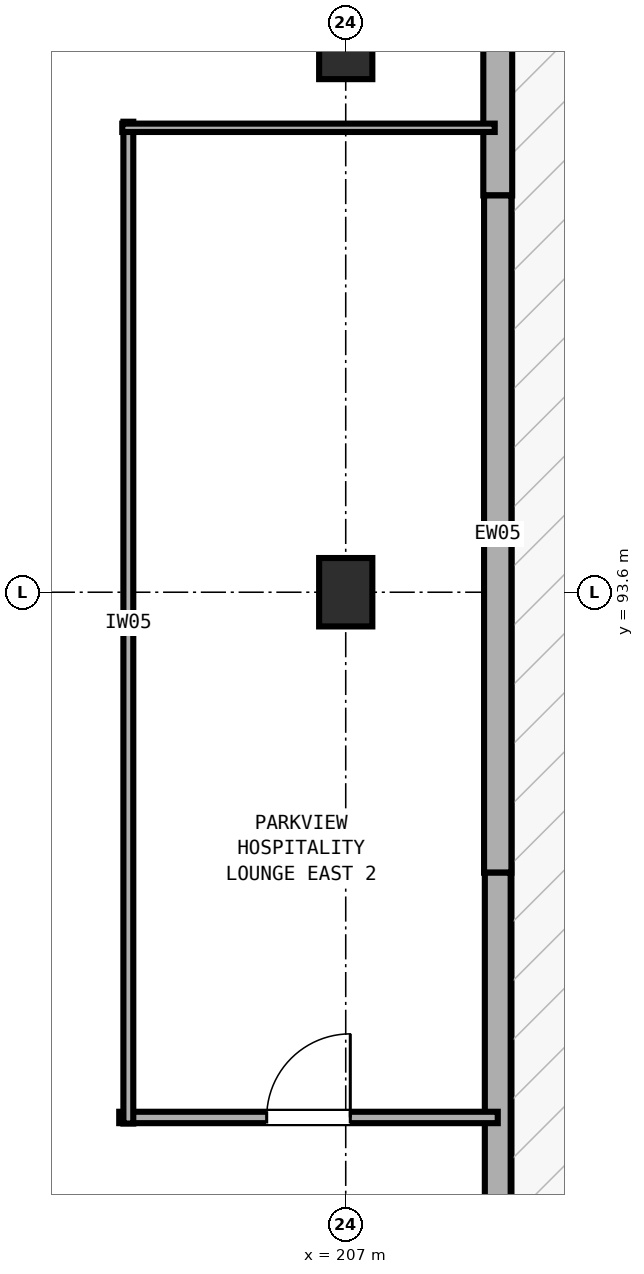
"""IFC4 building model, lengths in metres.
Left out: names, types, materials, properties, quantities, classifications, styles, units other than length and angle.
Written with IfcOpenShell. Run it as: python <this file> out.ifc"""

import sys

from ifc_helpers import new_model, si_unit, direction, frame, frame_2d, origin, origin_2d, place, context, subcontext, project, spatial, rectangle, extrude, element, fill, save


model = new_model("IFC4")
c1 = context("Model", 3, precision=1e-05, world=origin(), true_north=direction((0.0, 1.0)))
c2 = subcontext(c1, "Body", "Model", "MODEL_VIEW")
j1 = project(units=[si_unit("LENGTHUNIT", "METRE"), si_unit("PLANEANGLEUNIT", "RADIAN")], contexts=[c1])
p1 = place(None, origin())
s1 = spatial("IfcSite", under=j1, at=p1, CompositionType="ELEMENT")
p2 = place(p1, origin())
s2 = spatial("IfcBuilding", under=s1, at=p2, CompositionType="ELEMENT")
p3 = place(p2, frame((0.0, 0.0, 14.4)))
s3 = spatial("IfcBuildingStorey", under=s2, at=p3, CompositionType="ELEMENT", Elevation=14.4)
for number, where, z_axis, x_axis in (
    (1, (207.0, 93.6, 0.0), (0.0, 0.0, 1.0), (1.0, 0.0, 0.0)),
    (2, (207.0, 100.8, 0.0), (0.0, 0.0, 1.0), (1.0, 0.0, 0.0)),
):
    element("IfcColumn", number, at=place(p3, frame(where, z_axis=z_axis, x_axis=x_axis)), inside=s3, PredefinedType="COLUMN", context=c2, shape_type="SweptSolid", body=[
        extrude(rectangle(XDim=0.7, YDim=0.9, at=origin_2d()), origin(), (0.0, 0.0, 1.0), 4.8),
    ])
p4 = place(p3, frame((209.0, 107.73, 0.0), z_axis=(0.0, 0.0, 1.0), x_axis=(0.0, -1.0, 0.0)))
e3 = element("IfcWall", 3, at=p4, inside=s3, PredefinedType="SOLIDWALL", context=c2, shape_type="SweptSolid", body=[
    extrude(rectangle(XDim=8.91, YDim=0.38, at=frame_2d((4.455, 0.0))), origin(), (0.0, 0.0, 1.0), 3.58),
])
p5 = place(p3, frame((209.0, 98.82, 0.0), z_axis=(0.0, 0.0, 1.0), x_axis=(0.0, -1.0, 0.0)))
e4 = element("IfcWall", 4, at=p5, inside=s3, PredefinedType="SOLIDWALL", context=c2, shape_type="SweptSolid", body=[
    extrude(rectangle(XDim=8.91, YDim=0.36, at=frame_2d((4.455, 0.0))), origin(), (0.0, 0.0, 1.0), 3.58),
])
p6 = place(p3, frame((209.0, 89.91, 0.0), z_axis=(0.0, 0.0, 1.0), x_axis=(0.0, -1.0, 0.0)))
e5 = element("IfcWall", 5, at=p6, inside=s3, PredefinedType="SOLIDWALL", context=c2, shape_type="SweptSolid", body=[
    extrude(rectangle(XDim=8.91, YDim=0.34, at=frame_2d((4.455, 0.0))), origin(), (0.0, 0.0, 1.0), 3.58),
])
p7 = place(p3, frame((204.02, 86.69, 0.0), z_axis=(0.0, 0.0, 1.0), x_axis=(1.0, 0.0, 0.0)))
e6 = element("IfcWall", 6, at=p7, inside=s3, PredefinedType="PARTITIONING", context=c2, shape_type="SweptSolid", body=[
    extrude(rectangle(XDim=4.98, YDim=0.15, at=frame_2d((2.49, 0.0))), origin(), (0.0, 0.0, 1.0), 3.56),
])
p8 = place(p7, frame((1.94, 0.0, 0.0)))
e7 = element("IfcOpeningElement", 7, at=p8, cuts=e6, PredefinedType="OPENING", context=c2, shape_type="SweptSolid", body=[
    extrude(rectangle(XDim=1.1, YDim=2.1, at=frame_2d((0.55, 1.05))), frame((0.0, 0.085, 0.0), z_axis=(0.0, -1.0, 0.0), x_axis=(1.0, 0.0, 0.0)), (0.0, 0.0, 1.0), 0.17),
])
p9 = place(p3, frame((204.14, 86.61, 0.0), z_axis=(0.0, 0.0, 1.0), x_axis=(0.0, 1.0, 0.0)))
e8 = element("IfcWall", 8, at=p9, inside=s3, PredefinedType="PARTITIONING", context=c2, shape_type="SweptSolid", body=[
    extrude(rectangle(XDim=13.18, YDim=0.13, at=frame_2d((6.59, 0.0))), origin(), (0.0, 0.0, 1.0), 3.56),
])
p10 = place(p3, frame((204.06, 99.71, 0.0), z_axis=(0.0, 0.0, 1.0), x_axis=(1.0, 0.0, 0.0)))
e9 = element("IfcWall", 9, at=p10, inside=s3, PredefinedType="PARTITIONING", context=c2, shape_type="SweptSolid", body=[
    extrude(rectangle(XDim=4.9, YDim=0.11, at=frame_2d((2.45, 0.0))), origin(), (0.0, 0.0, 1.0), 3.56),
])
p11 = place(p8, origin())
e10 = element("IfcDoor", 10, at=p11, inside=s3, OperationType="SINGLE_SWING_RIGHT", PredefinedType="DOOR", context=c2, shape_type="SweptSolid", body=[
    extrude(rectangle(XDim=1.1, YDim=2.1, at=frame_2d((0.55, 1.05))), frame((0.0, 0.025, 0.0), z_axis=(0.0, -1.0, 0.0), x_axis=(1.0, 0.0, 0.0)), (0.0, 0.0, 1.0), 0.05),
])
fill(e7, e10)
save(model, sys.argv[1])
